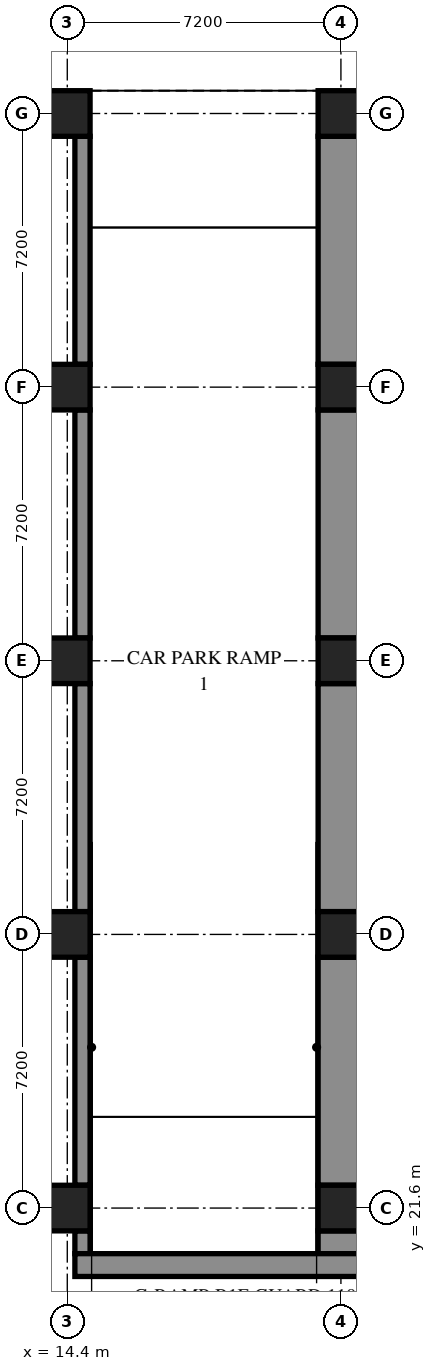
"""IFC4 building model, lengths in metres.
Left out: names, types, materials, properties, quantities, classifications, styles, units other than length and angle.
Written with IfcOpenShell. Run it as: python <this file> out.ifc"""

import sys

from ifc_helpers import new_model, si_unit, direction, frame, frame_2d, origin, origin_2d, place, context, subcontext, project, spatial, rectangle, extrude, element, save


model = new_model("IFC4")
c1 = context("Model", 3, precision=1e-05, world=origin(), true_north=direction((0.0, 1.0)))
c2 = subcontext(c1, "Body", "Model", "MODEL_VIEW")
j1 = project(units=[si_unit("LENGTHUNIT", "METRE"), si_unit("PLANEANGLEUNIT", "RADIAN")], contexts=[c1])
p1 = place(None, origin())
s1 = spatial("IfcSite", under=j1, at=p1, CompositionType="ELEMENT")
p2 = place(p1, origin())
s2 = spatial("IfcBuilding", under=s1, at=p2, CompositionType="ELEMENT")
p3 = place(p2, frame((0.0, 0.0, -4.5)))
s3 = spatial("IfcBuildingStorey", under=s2, at=p3, CompositionType="ELEMENT", Elevation=-4.5)
for number, where, z_axis, x_axis in (
    (1, (14.4, 21.6, 0.0), (0.0, 0.0, 1.0), (1.0, 0.0, 0.0)),
    (2, (14.4, 28.8, 0.0), (0.0, 0.0, 1.0), (1.0, 0.0, 0.0)),
    (3, (14.4, 36.0, 0.0), (0.0, 0.0, 1.0), (1.0, 0.0, 0.0)),
    (4, (14.4, 43.2, 0.0), (0.0, 0.0, 1.0), (1.0, 0.0, 0.0)),
    (5, (14.4, 50.4, 0.0), (0.0, 0.0, 1.0), (1.0, 0.0, 0.0)),
    (6, (21.6, 21.6, 0.0), (0.0, 0.0, 1.0), (1.0, 0.0, 0.0)),
    (7, (21.6, 28.8, 0.0), (0.0, 0.0, 1.0), (1.0, 0.0, 0.0)),
    (8, (21.6, 36.0, 0.0), (0.0, 0.0, 1.0), (1.0, 0.0, 0.0)),
    (9, (21.6, 43.2, 0.0), (0.0, 0.0, 1.0), (1.0, 0.0, 0.0)),
    (10, (21.6, 50.4, 0.0), (0.0, 0.0, 1.0), (1.0, 0.0, 0.0)),
):
    element("IfcColumn", number, at=place(p3, frame(where, z_axis=z_axis, x_axis=x_axis)), inside=s3, PredefinedType="COLUMN", context=c2, shape_type="SweptSolid", body=[
        extrude(rectangle(XDim=1.2, YDim=1.2, at=origin_2d()), origin(), (0.0, 0.0, 1.0), 4.1),
    ])
p4 = place(p3, frame((14.8, 20.4, 0.0), z_axis=(0.0, 0.0, 1.0), x_axis=(0.0, 1.0, 0.0)))
e11 = element("IfcWall", 11, at=p4, inside=s3, PredefinedType="SOLIDWALL", context=c2, shape_type="SweptSolid", body=[
    extrude(rectangle(XDim=0.6, YDim=0.4, at=frame_2d((0.3, 0.0))), origin(), (0.0, 0.0, 1.0), 4.1),
])
for number, where, z_axis, x_axis in (
    (12, (14.8, 22.2, 0.0), (0.0, 0.0, 1.0), (0.0, 1.0, 0.0)),
    (13, (14.8, 29.4, 0.0), (0.0, 0.0, 1.0), (0.0, 1.0, 0.0)),
    (14, (14.8, 36.6, 0.0), (0.0, 0.0, 1.0), (0.0, 1.0, 0.0)),
    (15, (14.8, 43.8, 0.0), (0.0, 0.0, 1.0), (0.0, 1.0, 0.0)),
):
    element("IfcWall", number, at=place(p3, frame(where, z_axis=z_axis, x_axis=x_axis)), inside=s3, PredefinedType="SOLIDWALL", context=c2, shape_type="SweptSolid", body=[
        extrude(rectangle(XDim=6.0, YDim=0.4, at=frame_2d((3.0, 0.0))), origin(), (0.0, 0.0, 1.0), 4.1),
    ])
p5 = place(p3, frame((21.6, 20.4, 0.0), z_axis=(0.0, 0.0, 1.0), x_axis=(0.0, 1.0, 0.0)))
e16 = element("IfcWall", 16, at=p5, inside=s3, PredefinedType="SOLIDWALL", context=c2, shape_type="SweptSolid", body=[
    extrude(rectangle(XDim=0.6, YDim=1.2, at=frame_2d((0.3, 0.0))), origin(), (0.0, 0.0, 1.0), 4.1),
])
for number, where, z_axis, x_axis in (
    (17, (21.6, 22.2, 0.0), (0.0, 0.0, 1.0), (0.0, 1.0, 0.0)),
    (18, (21.6, 29.4, 0.0), (0.0, 0.0, 1.0), (0.0, 1.0, 0.0)),
    (19, (21.6, 36.6, 0.0), (0.0, 0.0, 1.0), (0.0, 1.0, 0.0)),
    (20, (21.6, 43.8, 0.0), (0.0, 0.0, 1.0), (0.0, 1.0, 0.0)),
):
    element("IfcWall", number, at=place(p3, frame(where, z_axis=z_axis, x_axis=x_axis)), inside=s3, PredefinedType="SOLIDWALL", context=c2, shape_type="SweptSolid", body=[
        extrude(rectangle(XDim=6.0, YDim=1.2, at=frame_2d((3.0, 0.0))), origin(), (0.0, 0.0, 1.0), 4.1),
    ])
p6 = place(p3, frame((14.6, 20.1, 0.0), z_axis=(0.0, 0.0, 1.0), x_axis=(1.0, 0.0, 0.0)))
e21 = element("IfcWall", 21, at=p6, inside=s3, PredefinedType="SOLIDWALL", context=c2, shape_type="SweptSolid", body=[
    extrude(rectangle(XDim=14.0, YDim=0.6, at=frame_2d((7.0, 0.0))), origin(), (0.0, 0.0, 1.0), 4.1),
])
save(model, sys.argv[1])
